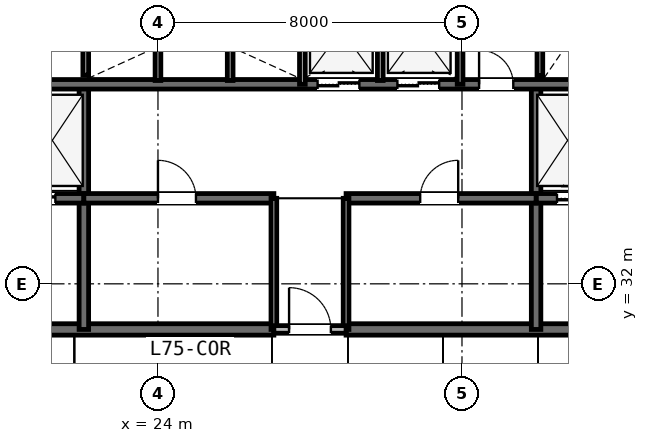
"""IFC4 building model, lengths in metres.
Left out: names, types, materials, properties, quantities, classifications, styles, units other than length and angle.
Written with IfcOpenShell. Run it as: python <this file> out.ifc"""

import sys

from ifc_helpers import new_model, si_unit, direction, frame, frame_2d, origin, place, context, subcontext, project, spatial, rectangle, extrude, element, fill, save


model = new_model("IFC4")
c1 = context("Model", 3, precision=1e-05, world=origin(), true_north=direction((0.0, 1.0)))
c2 = subcontext(c1, "Body", "Model", "MODEL_VIEW")
j1 = project(units=[si_unit("LENGTHUNIT", "METRE"), si_unit("PLANEANGLEUNIT", "RADIAN")], contexts=[c1])
p1 = place(None, origin())
s1 = spatial("IfcSite", under=j1, at=p1, CompositionType="ELEMENT")
p2 = place(p1, origin())
s2 = spatial("IfcBuilding", under=s1, at=p2, CompositionType="ELEMENT")
p3 = place(p2, frame((0.0, 0.0, 290.6)))
s3 = spatial("IfcBuildingStorey", under=s2, at=p3, CompositionType="ELEMENT", Elevation=290.6)
p4 = place(p3, frame((15.85, 30.8, 0.0), z_axis=(0.0, 0.0, 1.0), x_axis=(1.0, 0.0, 0.0)))
e1 = element("IfcWall", 1, at=p4, inside=s3, PredefinedType="SHEAR", context=c2, shape_type="SweptSolid", body=[
    extrude(rectangle(XDim=11.2, YDim=0.3, at=frame_2d((5.6, 0.0))), origin(), (0.0, 0.0, 1.0), 5.2),
])
p5 = place(p4, frame((2.45, 0.0, 0.0)))
e2 = element("IfcOpeningElement", 2, at=p5, cuts=e1, PredefinedType="OPENING", context=c2, shape_type="SweptSolid", body=[
    extrude(rectangle(XDim=1.1, YDim=2.15, at=frame_2d((0.55, 1.075))), frame((0.0, 0.16, 0.0), z_axis=(0.0, -1.0, 0.0), x_axis=(1.0, 0.0, 0.0)), (0.0, 0.0, 1.0), 0.32),
])
p6 = place(p3, frame((28.95, 30.8, 0.0), z_axis=(0.0, 0.0, 1.0), x_axis=(1.0, 0.0, 0.0)))
e3 = element("IfcWall", 3, at=p6, inside=s3, PredefinedType="SHEAR", context=c2, shape_type="SweptSolid", body=[
    extrude(rectangle(XDim=11.2, YDim=0.3, at=frame_2d((5.6, 0.0))), origin(), (0.0, 0.0, 1.0), 5.2),
])
p7 = place(p6, frame((7.65, 0.0, 0.0)))
e4 = element("IfcOpeningElement", 4, at=p7, cuts=e3, PredefinedType="OPENING", context=c2, shape_type="SweptSolid", body=[
    extrude(rectangle(XDim=1.1, YDim=2.15, at=frame_2d((0.55, 1.075))), frame((0.0, 0.16, 0.0), z_axis=(0.0, -1.0, 0.0), x_axis=(1.0, 0.0, 0.0)), (0.0, 0.0, 1.0), 0.32),
])
for number, where, z_axis, x_axis in (
    (5, (22.05, 30.8, 0.0), (0.0, 0.0, 1.0), (0.0, 1.0, 0.0)),
    (6, (33.95, 30.8, 0.0), (0.0, 0.0, 1.0), (0.0, 1.0, 0.0)),
):
    element("IfcWall", number, at=place(p3, frame(where, z_axis=z_axis, x_axis=x_axis)), inside=s3, PredefinedType="SHEAR", context=c2, shape_type="SweptSolid", body=[
        extrude(rectangle(XDim=6.45, YDim=0.25, at=frame_2d((3.225, 0.0))), origin(), (0.0, 0.0, 1.0), 5.2),
    ])
p8 = place(p3, frame((16.0, 34.25, 0.0), z_axis=(0.0, 0.0, 1.0), x_axis=(1.0, 0.0, 0.0)))
e7 = element("IfcWall", 7, at=p8, inside=s3, PredefinedType="SHEAR", context=c2, shape_type="SweptSolid", body=[
    extrude(rectangle(XDim=6.05, YDim=0.25, at=frame_2d((3.025, 0.0))), origin(), (0.0, 0.0, 1.0), 5.2),
])
p9 = place(p8, frame((1.25, 0.0, 0.0)))
e8 = element("IfcOpeningElement", 8, at=p9, cuts=e7, PredefinedType="OPENING", context=c2, shape_type="SweptSolid", body=[
    extrude(rectangle(XDim=1.0, YDim=2.15, at=frame_2d((0.5, 1.075))), frame((0.0, 0.135, 0.0), z_axis=(0.0, -1.0, 0.0), x_axis=(1.0, 0.0, 0.0)), (0.0, 0.0, 1.0), 0.27),
])
p10 = place(p8, frame((4.2, 0.0, 0.0)))
e9 = element("IfcOpeningElement", 9, at=p10, cuts=e7, PredefinedType="OPENING", context=c2, shape_type="SweptSolid", body=[
    extrude(rectangle(XDim=1.1, YDim=2.15, at=frame_2d((0.55, 1.075))), frame((0.0, 0.135, 0.0), z_axis=(0.0, -1.0, 0.0), x_axis=(1.0, 0.0, 0.0)), (0.0, 0.0, 1.0), 0.27),
])
p11 = place(p3, frame((33.95, 34.25, 0.0), z_axis=(0.0, 0.0, 1.0), x_axis=(1.0, 0.0, 0.0)))
e10 = element("IfcWall", 10, at=p11, inside=s3, PredefinedType="SHEAR", context=c2, shape_type="SweptSolid", body=[
    extrude(rectangle(XDim=6.05, YDim=0.25, at=frame_2d((3.025, 0.0))), origin(), (0.0, 0.0, 1.0), 5.2),
])
p12 = place(p11, frame((3.7, 0.0, 0.0)))
e11 = element("IfcOpeningElement", 11, at=p12, cuts=e10, PredefinedType="OPENING", context=c2, shape_type="SweptSolid", body=[
    extrude(rectangle(XDim=1.0, YDim=2.15, at=frame_2d((0.5, 1.075))), frame((0.0, 0.135, 0.0), z_axis=(0.0, -1.0, 0.0), x_axis=(1.0, 0.0, 0.0)), (0.0, 0.0, 1.0), 0.27),
])
p13 = place(p11, frame((0.55, 0.0, 0.0)))
e12 = element("IfcOpeningElement", 12, at=p13, cuts=e10, PredefinedType="OPENING", context=c2, shape_type="SweptSolid", body=[
    extrude(rectangle(XDim=1.1, YDim=2.15, at=frame_2d((0.55, 1.075))), frame((0.0, 0.135, 0.0), z_axis=(0.0, -1.0, 0.0), x_axis=(1.0, 0.0, 0.0)), (0.0, 0.0, 1.0), 0.27),
])
p14 = place(p3, frame((22.05, 34.25, 0.0), z_axis=(0.0, 0.0, 1.0), x_axis=(1.0, 0.0, 0.0)))
e13 = element("IfcWall", 13, at=p14, inside=s3, PredefinedType="SHEAR", context=c2, shape_type="SweptSolid", body=[
    extrude(rectangle(XDim=5.0, YDim=0.25, at=frame_2d((2.5, 0.0))), origin(), (0.0, 0.0, 1.0), 5.2),
])
p15 = place(p14, frame((1.95, 0.0, 0.0)))
e14 = element("IfcOpeningElement", 14, at=p15, cuts=e13, PredefinedType="OPENING", context=c2, shape_type="SweptSolid", body=[
    extrude(rectangle(XDim=1.0, YDim=2.15, at=frame_2d((0.5, 1.075))), frame((0.0, 0.135, 0.0), z_axis=(0.0, -1.0, 0.0), x_axis=(1.0, 0.0, 0.0)), (0.0, 0.0, 1.0), 0.27),
])
p16 = place(p3, frame((28.95, 34.25, 0.0), z_axis=(0.0, 0.0, 1.0), x_axis=(1.0, 0.0, 0.0)))
e15 = element("IfcWall", 15, at=p16, inside=s3, PredefinedType="SHEAR", context=c2, shape_type="SweptSolid", body=[
    extrude(rectangle(XDim=5.0, YDim=0.25, at=frame_2d((2.5, 0.0))), origin(), (0.0, 0.0, 1.0), 5.2),
])
p17 = place(p16, frame((1.95, 0.0, 0.0)))
e16 = element("IfcOpeningElement", 16, at=p17, cuts=e15, PredefinedType="OPENING", context=c2, shape_type="SweptSolid", body=[
    extrude(rectangle(XDim=1.0, YDim=2.15, at=frame_2d((0.5, 1.075))), frame((0.0, 0.135, 0.0), z_axis=(0.0, -1.0, 0.0), x_axis=(1.0, 0.0, 0.0)), (0.0, 0.0, 1.0), 0.27),
])
p18 = place(p3, frame((19.9, 37.25, 0.0), z_axis=(0.0, 0.0, 1.0), x_axis=(1.0, 0.0, 0.0)))
e17 = element("IfcWall", 17, at=p18, inside=s3, PredefinedType="SHEAR", context=c2, shape_type="SweptSolid", body=[
    extrude(rectangle(XDim=16.2, YDim=0.25, at=frame_2d((8.1, 0.0))), origin(), (0.0, 0.0, 1.0), 5.2),
])
p19 = place(p18, frame((12.55, 0.0, 0.0)))
e18 = element("IfcOpeningElement", 18, at=p19, cuts=e17, PredefinedType="OPENING", context=c2, shape_type="SweptSolid", body=[
    extrude(rectangle(XDim=0.9, YDim=2.15, at=frame_2d((0.45, 1.075))), frame((0.0, 0.135, 0.0), z_axis=(0.0, -1.0, 0.0), x_axis=(1.0, 0.0, 0.0)), (0.0, 0.0, 1.0), 0.27),
])
p20 = place(p18, frame((8.3, 0.0, 0.0)))
e19 = element("IfcOpeningElement", 19, at=p20, cuts=e17, PredefinedType="OPENING", context=c2, shape_type="SweptSolid", body=[
    extrude(rectangle(XDim=1.1, YDim=2.15, at=frame_2d((0.55, 1.075))), frame((0.0, 0.135, 0.0), z_axis=(0.0, -1.0, 0.0), x_axis=(1.0, 0.0, 0.0)), (0.0, 0.0, 1.0), 0.27),
])
p21 = place(p18, frame((10.4, 0.0, 0.0)))
e20 = element("IfcOpeningElement", 20, at=p21, cuts=e17, PredefinedType="OPENING", context=c2, shape_type="SweptSolid", body=[
    extrude(rectangle(XDim=1.1, YDim=2.15, at=frame_2d((0.55, 1.075))), frame((0.0, 0.135, 0.0), z_axis=(0.0, -1.0, 0.0), x_axis=(1.0, 0.0, 0.0)), (0.0, 0.0, 1.0), 0.27),
])
for number, where, z_axis, x_axis in (
    (21, (27.05, 30.8, 0.0), (0.0, 0.0, 1.0), (0.0, 1.0, 0.0)),
    (22, (28.95, 30.8, 0.0), (0.0, 0.0, 1.0), (0.0, 1.0, 0.0)),
):
    element("IfcWall", number, at=place(p3, frame(where, z_axis=z_axis, x_axis=x_axis)), inside=s3, PredefinedType="PLUMBINGWALL", context=c2, shape_type="SweptSolid", body=[
        extrude(rectangle(XDim=3.45, YDim=0.15, at=frame_2d((1.725, 0.0))), origin(), (0.0, 0.0, 1.0), 4.67),
    ])
p22 = place(p3, frame((27.05, 30.8, 0.0), z_axis=(0.0, 0.0, 1.0), x_axis=(1.0, 0.0, 0.0)))
e23 = element("IfcWall", 23, at=p22, inside=s3, PredefinedType="PARTITIONING", context=c2, shape_type="SweptSolid", body=[
    extrude(rectangle(XDim=1.9, YDim=0.2, at=frame_2d((0.95, 0.0))), origin(), (0.0, 0.0, 1.0), 4.67),
])
p23 = place(p22, frame((0.4, 0.0, 0.0)))
e24 = element("IfcOpeningElement", 24, at=p23, cuts=e23, PredefinedType="OPENING", context=c2, shape_type="SweptSolid", body=[
    extrude(rectangle(XDim=1.1, YDim=2.15, at=frame_2d((0.55, 1.075))), frame((0.0, 0.11, 0.0), z_axis=(0.0, -1.0, 0.0), x_axis=(1.0, 0.0, 0.0)), (0.0, 0.0, 1.0), 0.22),
])
p24 = place(p3, frame((22.1, 37.49, 0.0), z_axis=(0.0, 0.0, 1.0), x_axis=(0.0, 1.0, 0.0)))
e25 = element("IfcWall", 25, at=p24, inside=s3, PredefinedType="PLUMBINGWALL", context=c2, shape_type="SweptSolid", body=[
    extrude(rectangle(XDim=2.56, YDim=0.15, at=frame_2d((1.28, 0.0))), origin(), (0.0, 0.0, 1.0), 4.87),
])
p25 = place(p3, frame((27.8, 37.25, 0.0), z_axis=(0.0, 0.0, 1.0), x_axis=(0.0, 1.0, 0.0)))
e26 = element("IfcWall", 26, at=p25, inside=s3, PredefinedType="PLUMBINGWALL", context=c2, shape_type="SweptSolid", body=[
    extrude(rectangle(XDim=2.8, YDim=0.15, at=frame_2d((1.4, 0.0))), origin(), (0.0, 0.0, 1.0), 4.87),
])
for number, where, z_axis, x_axis in (
    (27, (24.0, 37.35, 0.0), (0.0, 0.0, 1.0), (0.0, 1.0, 0.0)),
    (28, (25.9, 37.35, 0.0), (0.0, 0.0, 1.0), (0.0, 1.0, 0.0)),
):
    element("IfcWall", number, at=place(p3, frame(where, z_axis=z_axis, x_axis=x_axis)), inside=s3, PredefinedType="PLUMBINGWALL", context=c2, shape_type="SweptSolid", body=[
        extrude(rectangle(XDim=2.6, YDim=0.15, at=frame_2d((1.3, 0.0))), origin(), (0.0, 0.0, 1.0), 4.87),
    ])
p26 = place(p3, frame((31.95, 37.25, 0.0), z_axis=(0.0, 0.0, 1.0), x_axis=(0.0, 1.0, 0.0)))
e29 = element("IfcWall", 29, at=p26, inside=s3, PredefinedType="PLUMBINGWALL", context=c2, shape_type="SweptSolid", body=[
    extrude(rectangle(XDim=2.8, YDim=0.15, at=frame_2d((1.4, 0.0))), origin(), (0.0, 0.0, 1.0), 4.87),
])
p27 = place(p3, frame((29.85, 37.35, 0.0), z_axis=(0.0, 0.0, 1.0), x_axis=(0.0, 1.0, 0.0)))
e30 = element("IfcWall", 30, at=p27, inside=s3, PredefinedType="PLUMBINGWALL", context=c2, shape_type="SweptSolid", body=[
    extrude(rectangle(XDim=2.6, YDim=0.15, at=frame_2d((1.3, 0.0))), origin(), (0.0, 0.0, 1.0), 4.87),
])
p28 = place(p3, frame((34.05, 37.473, 0.0), z_axis=(0.0, 0.0, 1.0), x_axis=(0.0, 1.0, 0.0)))
e31 = element("IfcWall", 31, at=p28, inside=s3, PredefinedType="PLUMBINGWALL", context=c2, shape_type="SweptSolid", body=[
    extrude(rectangle(XDim=2.577, YDim=0.15, at=frame_2d((1.288, 0.0))), origin(), (0.0, 0.0, 1.0), 4.87),
])
p29 = place(p23, origin())
e32 = element("IfcDoor", 32, at=p29, inside=s3, OperationType="SINGLE_SWING_LEFT", PredefinedType="DOOR", context=c2, shape_type="SweptSolid", body=[
    extrude(rectangle(XDim=1.1, YDim=2.15, at=frame_2d((0.55, 1.075))), frame((0.0, 0.025, 0.0), z_axis=(0.0, -1.0, 0.0), x_axis=(1.0, 0.0, 0.0)), (0.0, 0.0, 1.0), 0.05),
])
fill(e24, e32)
p30 = place(p15, origin())
e33 = element("IfcDoor", 33, at=p30, inside=s3, OperationType="SINGLE_SWING_LEFT", PredefinedType="DOOR", context=c2, shape_type="SweptSolid", body=[
    extrude(rectangle(XDim=1.0, YDim=2.15, at=frame_2d((0.5, 1.075))), frame((0.0, 0.025, 0.0), z_axis=(0.0, -1.0, 0.0), x_axis=(1.0, 0.0, 0.0)), (0.0, 0.0, 1.0), 0.05),
])
fill(e14, e33)
p31 = place(p17, origin())
e34 = element("IfcDoor", 34, at=p31, inside=s3, OperationType="SINGLE_SWING_RIGHT", PredefinedType="DOOR", context=c2, shape_type="SweptSolid", body=[
    extrude(rectangle(XDim=1.0, YDim=2.15, at=frame_2d((0.5, 1.075))), frame((0.0, 0.025, 0.0), z_axis=(0.0, -1.0, 0.0), x_axis=(1.0, 0.0, 0.0)), (0.0, 0.0, 1.0), 0.05),
])
fill(e16, e34)
p32 = place(p19, origin())
e35 = element("IfcDoor", 35, at=p32, inside=s3, OperationType="SINGLE_SWING_LEFT", PredefinedType="DOOR", context=c2, shape_type="SweptSolid", body=[
    extrude(rectangle(XDim=0.9, YDim=2.15, at=frame_2d((0.45, 1.075))), frame((0.0, 0.025, 0.0), z_axis=(0.0, -1.0, 0.0), x_axis=(1.0, 0.0, 0.0)), (0.0, 0.0, 1.0), 0.05),
])
fill(e18, e35)
p33 = place(p10, origin())
e36 = element("IfcDoor", 36, at=p33, inside=s3, OperationType="DOUBLE_DOOR_SLIDING", PredefinedType="DOOR", context=c2, shape_type="SweptSolid", body=[
    extrude(rectangle(XDim=1.1, YDim=2.15, at=frame_2d((0.55, 1.075))), frame((0.0, 0.025, 0.0), z_axis=(0.0, -1.0, 0.0), x_axis=(1.0, 0.0, 0.0)), (0.0, 0.0, 1.0), 0.05),
])
fill(e9, e36)
p34 = place(p13, origin())
e37 = element("IfcDoor", 37, at=p34, inside=s3, OperationType="DOUBLE_DOOR_SLIDING", PredefinedType="DOOR", context=c2, shape_type="SweptSolid", body=[
    extrude(rectangle(XDim=1.1, YDim=2.15, at=frame_2d((0.55, 1.075))), frame((0.0, 0.025, 0.0), z_axis=(0.0, -1.0, 0.0), x_axis=(1.0, 0.0, 0.0)), (0.0, 0.0, 1.0), 0.05),
])
fill(e12, e37)
p35 = place(p20, origin())
e38 = element("IfcDoor", 38, at=p35, inside=s3, OperationType="DOUBLE_DOOR_SLIDING", PredefinedType="DOOR", context=c2, shape_type="SweptSolid", body=[
    extrude(rectangle(XDim=1.1, YDim=2.15, at=frame_2d((0.55, 1.075))), frame((0.0, 0.025, 0.0), z_axis=(0.0, -1.0, 0.0), x_axis=(1.0, 0.0, 0.0)), (0.0, 0.0, 1.0), 0.05),
])
fill(e19, e38)
p36 = place(p21, origin())
e39 = element("IfcDoor", 39, at=p36, inside=s3, OperationType="DOUBLE_DOOR_SLIDING", PredefinedType="DOOR", context=c2, shape_type="SweptSolid", body=[
    extrude(rectangle(XDim=1.1, YDim=2.15, at=frame_2d((0.55, 1.075))), frame((0.0, 0.025, 0.0), z_axis=(0.0, -1.0, 0.0), x_axis=(1.0, 0.0, 0.0)), (0.0, 0.0, 1.0), 0.05),
])
fill(e20, e39)
save(model, sys.argv[1])
